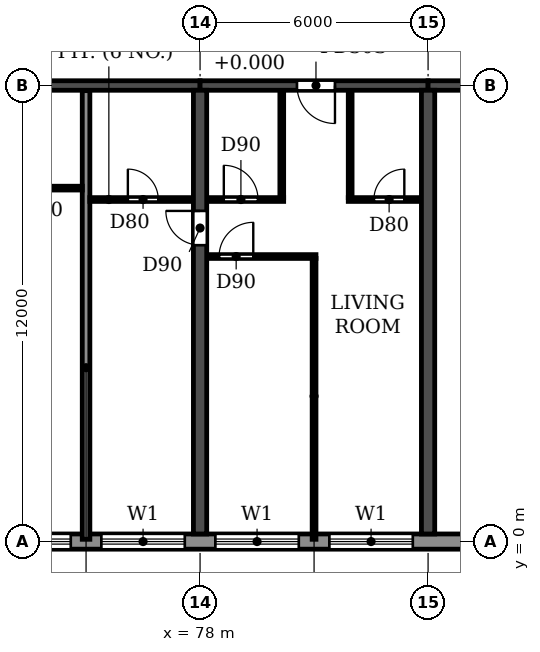
"""IFC4 building model, lengths in metres.
Left out: names, types, materials, properties, quantities, classifications, styles, units other than length and angle.
Written with IfcOpenShell. Run it as: python <this file> out.ifc"""

import sys

from ifc_helpers import new_model, si_unit, direction, frame, frame_2d, origin, place, context, subcontext, project, spatial, rectangle, extrude, element, fill, save


model = new_model("IFC4")
c1 = context("Model", 3, precision=1e-05, world=origin(), true_north=direction((0.0, 1.0)))
c2 = subcontext(c1, "Body", "Model", "MODEL_VIEW")
j1 = project(units=[si_unit("LENGTHUNIT", "METRE"), si_unit("PLANEANGLEUNIT", "RADIAN")], contexts=[c1])
p1 = place(None, origin())
s1 = spatial("IfcSite", under=j1, at=p1, CompositionType="ELEMENT")
p2 = place(p1, origin())
s2 = spatial("IfcBuilding", under=s1, at=p2, CompositionType="ELEMENT")
p3 = place(p2, frame((0.0, 0.0, 109.2)))
s3 = spatial("IfcBuildingStorey", under=s2, at=p3, CompositionType="ELEMENT", Elevation=109.2)
p4 = place(p3, frame((78.0, 0.2, 0.0), z_axis=(0.0, 0.0, 1.0), x_axis=(0.0, 1.0, 0.0)))
e1 = element("IfcWall", 1, at=p4, inside=s3, PredefinedType="SHEAR", context=c2, shape_type="SweptSolid", body=[
    extrude(rectangle(XDim=11.675, YDim=0.35, at=frame_2d((5.837, 0.0))), origin(), (0.0, 0.0, 1.0), 3.06),
])
p5 = place(p4, frame((7.6, 0.0, 0.0)))
e2 = element("IfcOpeningElement", 2, at=p5, cuts=e1, PredefinedType="OPENING", context=c2, shape_type="SweptSolid", body=[
    extrude(rectangle(XDim=0.9, YDim=2.1, at=frame_2d((0.45, 1.05))), frame((0.0, 0.185, 0.0), z_axis=(0.0, -1.0, 0.0), x_axis=(1.0, 0.0, 0.0)), (0.0, 0.0, 1.0), 0.37),
])
p6 = place(p3, frame((84.0, 0.2, 0.0), z_axis=(0.0, 0.0, 1.0), x_axis=(0.0, 1.0, 0.0)))
e3 = element("IfcWall", 3, at=p6, inside=s3, PredefinedType="SHEAR", context=c2, shape_type="SweptSolid", body=[
    extrude(rectangle(XDim=11.675, YDim=0.35, at=frame_2d((5.837, 0.0))), origin(), (0.0, 0.0, 1.0), 3.06),
])
p7 = place(p3, frame((72.0, 12.0, 0.0), z_axis=(0.0, 0.0, 1.0), x_axis=(1.0, 0.0, 0.0)))
e4 = element("IfcWall", 4, at=p7, inside=s3, PredefinedType="SHEAR", context=c2, shape_type="SweptSolid", body=[
    extrude(rectangle(XDim=6.0, YDim=0.25, at=frame_2d((3.0, 0.0))), origin(), (0.0, 0.0, 1.0), 2.46),
])
p8 = place(p3, frame((78.0, 12.0, 0.0), z_axis=(0.0, 0.0, 1.0), x_axis=(1.0, 0.0, 0.0)))
e5 = element("IfcWall", 5, at=p8, inside=s3, PredefinedType="SHEAR", context=c2, shape_type="SweptSolid", body=[
    extrude(rectangle(XDim=6.0, YDim=0.25, at=frame_2d((3.0, 0.0))), origin(), (0.0, 0.0, 1.0), 2.46),
])
p9 = place(p8, frame((2.55, 0.0, 0.0)))
e6 = element("IfcOpeningElement", 6, at=p9, cuts=e5, PredefinedType="OPENING", context=c2, shape_type="SweptSolid", body=[
    extrude(rectangle(XDim=1.0, YDim=2.1, at=frame_2d((0.5, 1.05))), frame((0.0, 0.135, 0.0), z_axis=(0.0, -1.0, 0.0), x_axis=(1.0, 0.0, 0.0)), (0.0, 0.0, 1.0), 0.27),
])
p10 = place(p3, frame((84.0, 12.0, 0.0), z_axis=(0.0, 0.0, 1.0), x_axis=(1.0, 0.0, 0.0)))
e7 = element("IfcWall", 7, at=p10, inside=s3, PredefinedType="SHEAR", context=c2, shape_type="SweptSolid", body=[
    extrude(rectangle(XDim=5.8, YDim=0.25, at=frame_2d((2.9, 0.0))), origin(), (0.0, 0.0, 1.0), 2.46),
])
p11 = place(p10, frame((2.5, 0.0, 0.0)))
e8 = element("IfcOpeningElement", 8, at=p11, cuts=e7, PredefinedType="OPENING", context=c2, shape_type="SweptSolid", body=[
    extrude(rectangle(XDim=1.0, YDim=2.1, at=frame_2d((0.5, 1.05))), frame((0.0, 0.135, 0.0), z_axis=(0.0, -1.0, 0.0), x_axis=(1.0, 0.0, 0.0)), (0.0, 0.0, 1.0), 0.27),
])
p12 = place(p3, frame((16.683, 0.0, 0.0), z_axis=(0.0, 0.0, 1.0), x_axis=(1.0, 0.0, 0.0)))
e9 = element("IfcWall", 9, at=p12, inside=s3, PredefinedType="STANDARD", context=c2, shape_type="SweptSolid", body=[
    extrude(rectangle(XDim=68.634, YDim=0.4, at=frame_2d((34.317, 0.0))), origin(), (0.0, 0.0, 1.0), 3.06),
])
p13 = place(p12, frame((1.717, 0.0, 0.9)))
e10 = element("IfcOpeningElement", 10, at=p13, cuts=e9, PredefinedType="OPENING", context=c2, shape_type="SweptSolid", body=[
    extrude(rectangle(XDim=2.2, YDim=1.5, at=frame_2d((1.1, 0.75))), frame((0.0, 0.21, 0.0), z_axis=(0.0, -1.0, 0.0), x_axis=(1.0, 0.0, 0.0)), (0.0, 0.0, 1.0), 0.42),
])
p14 = place(p12, frame((4.717, 0.0, 0.9)))
e11 = element("IfcOpeningElement", 11, at=p14, cuts=e9, PredefinedType="OPENING", context=c2, shape_type="SweptSolid", body=[
    extrude(rectangle(XDim=2.2, YDim=1.5, at=frame_2d((1.1, 0.75))), frame((0.0, 0.21, 0.0), z_axis=(0.0, -1.0, 0.0), x_axis=(1.0, 0.0, 0.0)), (0.0, 0.0, 1.0), 0.42),
])
p15 = place(p12, frame((7.717, 0.0, 0.9)))
e12 = element("IfcOpeningElement", 12, at=p15, cuts=e9, PredefinedType="OPENING", context=c2, shape_type="SweptSolid", body=[
    extrude(rectangle(XDim=2.2, YDim=1.5, at=frame_2d((1.1, 0.75))), frame((0.0, 0.21, 0.0), z_axis=(0.0, -1.0, 0.0), x_axis=(1.0, 0.0, 0.0)), (0.0, 0.0, 1.0), 0.42),
])
p16 = place(p12, frame((10.917, 0.0, 0.0)))
e13 = element("IfcOpeningElement", 13, at=p16, cuts=e9, PredefinedType="OPENING", context=c2, shape_type="SweptSolid", body=[
    extrude(rectangle(XDim=1.8, YDim=2.4, at=frame_2d((0.9, 1.2))), frame((0.0, 0.21, 0.0), z_axis=(0.0, -1.0, 0.0), x_axis=(1.0, 0.0, 0.0)), (0.0, 0.0, 1.0), 0.42),
])
p17 = place(p12, frame((13.717, 0.0, 0.9)))
e14 = element("IfcOpeningElement", 14, at=p17, cuts=e9, PredefinedType="OPENING", context=c2, shape_type="SweptSolid", body=[
    extrude(rectangle(XDim=2.2, YDim=1.5, at=frame_2d((1.1, 0.75))), frame((0.0, 0.21, 0.0), z_axis=(0.0, -1.0, 0.0), x_axis=(1.0, 0.0, 0.0)), (0.0, 0.0, 1.0), 0.42),
])
p18 = place(p12, frame((16.717, 0.0, 0.9)))
e15 = element("IfcOpeningElement", 15, at=p18, cuts=e9, PredefinedType="OPENING", context=c2, shape_type="SweptSolid", body=[
    extrude(rectangle(XDim=2.2, YDim=1.5, at=frame_2d((1.1, 0.75))), frame((0.0, 0.21, 0.0), z_axis=(0.0, -1.0, 0.0), x_axis=(1.0, 0.0, 0.0)), (0.0, 0.0, 1.0), 0.42),
])
p19 = place(p12, frame((19.717, 0.0, 0.9)))
e16 = element("IfcOpeningElement", 16, at=p19, cuts=e9, PredefinedType="OPENING", context=c2, shape_type="SweptSolid", body=[
    extrude(rectangle(XDim=2.2, YDim=1.5, at=frame_2d((1.1, 0.75))), frame((0.0, 0.21, 0.0), z_axis=(0.0, -1.0, 0.0), x_axis=(1.0, 0.0, 0.0)), (0.0, 0.0, 1.0), 0.42),
])
p20 = place(p12, frame((22.717, 0.0, 0.9)))
e17 = element("IfcOpeningElement", 17, at=p20, cuts=e9, PredefinedType="OPENING", context=c2, shape_type="SweptSolid", body=[
    extrude(rectangle(XDim=2.2, YDim=1.5, at=frame_2d((1.1, 0.75))), frame((0.0, 0.21, 0.0), z_axis=(0.0, -1.0, 0.0), x_axis=(1.0, 0.0, 0.0)), (0.0, 0.0, 1.0), 0.42),
])
p21 = place(p12, frame((25.717, 0.0, 0.9)))
e18 = element("IfcOpeningElement", 18, at=p21, cuts=e9, PredefinedType="OPENING", context=c2, shape_type="SweptSolid", body=[
    extrude(rectangle(XDim=2.2, YDim=1.5, at=frame_2d((1.1, 0.75))), frame((0.0, 0.21, 0.0), z_axis=(0.0, -1.0, 0.0), x_axis=(1.0, 0.0, 0.0)), (0.0, 0.0, 1.0), 0.42),
])
p22 = place(p12, frame((28.717, 0.0, 0.9)))
e19 = element("IfcOpeningElement", 19, at=p22, cuts=e9, PredefinedType="OPENING", context=c2, shape_type="SweptSolid", body=[
    extrude(rectangle(XDim=2.2, YDim=1.5, at=frame_2d((1.1, 0.75))), frame((0.0, 0.21, 0.0), z_axis=(0.0, -1.0, 0.0), x_axis=(1.0, 0.0, 0.0)), (0.0, 0.0, 1.0), 0.42),
])
p23 = place(p12, frame((31.917, 0.0, 0.0)))
e20 = element("IfcOpeningElement", 20, at=p23, cuts=e9, PredefinedType="OPENING", context=c2, shape_type="SweptSolid", body=[
    extrude(rectangle(XDim=1.8, YDim=2.4, at=frame_2d((0.9, 1.2))), frame((0.0, 0.21, 0.0), z_axis=(0.0, -1.0, 0.0), x_axis=(1.0, 0.0, 0.0)), (0.0, 0.0, 1.0), 0.42),
])
p24 = place(p12, frame((34.717, 0.0, 0.9)))
e21 = element("IfcOpeningElement", 21, at=p24, cuts=e9, PredefinedType="OPENING", context=c2, shape_type="SweptSolid", body=[
    extrude(rectangle(XDim=2.2, YDim=1.5, at=frame_2d((1.1, 0.75))), frame((0.0, 0.21, 0.0), z_axis=(0.0, -1.0, 0.0), x_axis=(1.0, 0.0, 0.0)), (0.0, 0.0, 1.0), 0.42),
])
p25 = place(p12, frame((37.717, 0.0, 0.9)))
e22 = element("IfcOpeningElement", 22, at=p25, cuts=e9, PredefinedType="OPENING", context=c2, shape_type="SweptSolid", body=[
    extrude(rectangle(XDim=2.2, YDim=1.5, at=frame_2d((1.1, 0.75))), frame((0.0, 0.21, 0.0), z_axis=(0.0, -1.0, 0.0), x_axis=(1.0, 0.0, 0.0)), (0.0, 0.0, 1.0), 0.42),
])
p26 = place(p12, frame((40.717, 0.0, 0.9)))
e23 = element("IfcOpeningElement", 23, at=p26, cuts=e9, PredefinedType="OPENING", context=c2, shape_type="SweptSolid", body=[
    extrude(rectangle(XDim=2.2, YDim=1.5, at=frame_2d((1.1, 0.75))), frame((0.0, 0.21, 0.0), z_axis=(0.0, -1.0, 0.0), x_axis=(1.0, 0.0, 0.0)), (0.0, 0.0, 1.0), 0.42),
])
p27 = place(p12, frame((43.717, 0.0, 0.9)))
e24 = element("IfcOpeningElement", 24, at=p27, cuts=e9, PredefinedType="OPENING", context=c2, shape_type="SweptSolid", body=[
    extrude(rectangle(XDim=2.2, YDim=1.5, at=frame_2d((1.1, 0.75))), frame((0.0, 0.21, 0.0), z_axis=(0.0, -1.0, 0.0), x_axis=(1.0, 0.0, 0.0)), (0.0, 0.0, 1.0), 0.42),
])
p28 = place(p12, frame((46.917, 0.0, 0.0)))
e25 = element("IfcOpeningElement", 25, at=p28, cuts=e9, PredefinedType="OPENING", context=c2, shape_type="SweptSolid", body=[
    extrude(rectangle(XDim=1.8, YDim=2.4, at=frame_2d((0.9, 1.2))), frame((0.0, 0.21, 0.0), z_axis=(0.0, -1.0, 0.0), x_axis=(1.0, 0.0, 0.0)), (0.0, 0.0, 1.0), 0.42),
])
p29 = place(p12, frame((49.717, 0.0, 0.9)))
e26 = element("IfcOpeningElement", 26, at=p29, cuts=e9, PredefinedType="OPENING", context=c2, shape_type="SweptSolid", body=[
    extrude(rectangle(XDim=2.2, YDim=1.5, at=frame_2d((1.1, 0.75))), frame((0.0, 0.21, 0.0), z_axis=(0.0, -1.0, 0.0), x_axis=(1.0, 0.0, 0.0)), (0.0, 0.0, 1.0), 0.42),
])
p30 = place(p12, frame((52.717, 0.0, 0.9)))
e27 = element("IfcOpeningElement", 27, at=p30, cuts=e9, PredefinedType="OPENING", context=c2, shape_type="SweptSolid", body=[
    extrude(rectangle(XDim=2.2, YDim=1.5, at=frame_2d((1.1, 0.75))), frame((0.0, 0.21, 0.0), z_axis=(0.0, -1.0, 0.0), x_axis=(1.0, 0.0, 0.0)), (0.0, 0.0, 1.0), 0.42),
])
p31 = place(p12, frame((55.717, 0.0, 0.9)))
e28 = element("IfcOpeningElement", 28, at=p31, cuts=e9, PredefinedType="OPENING", context=c2, shape_type="SweptSolid", body=[
    extrude(rectangle(XDim=2.2, YDim=1.5, at=frame_2d((1.1, 0.75))), frame((0.0, 0.21, 0.0), z_axis=(0.0, -1.0, 0.0), x_axis=(1.0, 0.0, 0.0)), (0.0, 0.0, 1.0), 0.42),
])
p32 = place(p12, frame((58.717, 0.0, 0.9)))
e29 = element("IfcOpeningElement", 29, at=p32, cuts=e9, PredefinedType="OPENING", context=c2, shape_type="SweptSolid", body=[
    extrude(rectangle(XDim=2.2, YDim=1.5, at=frame_2d((1.1, 0.75))), frame((0.0, 0.21, 0.0), z_axis=(0.0, -1.0, 0.0), x_axis=(1.0, 0.0, 0.0)), (0.0, 0.0, 1.0), 0.42),
])
p33 = place(p12, frame((61.717, 0.0, 0.9)))
e30 = element("IfcOpeningElement", 30, at=p33, cuts=e9, PredefinedType="OPENING", context=c2, shape_type="SweptSolid", body=[
    extrude(rectangle(XDim=2.2, YDim=1.5, at=frame_2d((1.1, 0.75))), frame((0.0, 0.21, 0.0), z_axis=(0.0, -1.0, 0.0), x_axis=(1.0, 0.0, 0.0)), (0.0, 0.0, 1.0), 0.42),
])
p34 = place(p12, frame((64.717, 0.0, 0.9)))
e31 = element("IfcOpeningElement", 31, at=p34, cuts=e9, PredefinedType="OPENING", context=c2, shape_type="SweptSolid", body=[
    extrude(rectangle(XDim=2.2, YDim=1.5, at=frame_2d((1.1, 0.75))), frame((0.0, 0.21, 0.0), z_axis=(0.0, -1.0, 0.0), x_axis=(1.0, 0.0, 0.0)), (0.0, 0.0, 1.0), 0.42),
])
p35 = place(p3, frame((75.0, 0.06, 0.0), z_axis=(0.0, 0.0, 1.0), x_axis=(0.0, 1.0, 0.0)))
e32 = element("IfcWall", 32, at=p35, inside=s3, PredefinedType="PARTITIONING", context=c2, shape_type="SweptSolid", body=[
    extrude(rectangle(XDim=11.805, YDim=0.2, at=frame_2d((5.902, 0.0))), origin(), (0.0, 0.0, 1.0), 3.06),
])
p36 = place(p3, frame((78.185, 7.5, 0.0), z_axis=(0.0, 0.0, 1.0), x_axis=(1.0, 0.0, 0.0)))
e33 = element("IfcWall", 33, at=p36, inside=s3, PredefinedType="PARTITIONING", context=c2, shape_type="SweptSolid", body=[
    extrude(rectangle(XDim=2.865, YDim=0.1, at=frame_2d((1.433, 0.0))), origin(), (0.0, 0.0, 1.0), 3.06),
])
p37 = place(p36, frame((0.315, 0.0, 0.0)))
e34 = element("IfcOpeningElement", 34, at=p37, cuts=e33, PredefinedType="OPENING", context=c2, shape_type="SweptSolid", body=[
    extrude(rectangle(XDim=0.9, YDim=2.1, at=frame_2d((0.45, 1.05))), frame((0.0, 0.06, 0.0), z_axis=(0.0, -1.0, 0.0), x_axis=(1.0, 0.0, 0.0)), (0.0, 0.0, 1.0), 0.12),
])
p38 = place(p3, frame((75.1, 9.0, 0.0), z_axis=(0.0, 0.0, 1.0), x_axis=(1.0, 0.0, 0.0)))
e35 = element("IfcWall", 35, at=p38, inside=s3, PredefinedType="PARTITIONING", context=c2, shape_type="SweptSolid", body=[
    extrude(rectangle(XDim=2.715, YDim=0.1, at=frame_2d((1.357, 0.0))), origin(), (0.0, 0.0, 1.0), 3.06),
])
p39 = place(p38, frame((1.0, 0.0, 0.0)))
e36 = element("IfcOpeningElement", 36, at=p39, cuts=e35, PredefinedType="OPENING", context=c2, shape_type="SweptSolid", body=[
    extrude(rectangle(XDim=0.8, YDim=2.1, at=frame_2d((0.4, 1.05))), frame((0.0, 0.06, 0.0), z_axis=(0.0, -1.0, 0.0), x_axis=(1.0, 0.0, 0.0)), (0.0, 0.0, 1.0), 0.12),
])
p40 = place(p3, frame((78.185, 9.0, 0.0), z_axis=(0.0, 0.0, 1.0), x_axis=(1.0, 0.0, 0.0)))
e37 = element("IfcWall", 37, at=p40, inside=s3, PredefinedType="PARTITIONING", context=c2, shape_type="SweptSolid", body=[
    extrude(rectangle(XDim=2.015, YDim=0.1, at=frame_2d((1.007, 0.0))), origin(), (0.0, 0.0, 1.0), 3.06),
])
p41 = place(p40, frame((0.44, 0.0, 0.0)))
e38 = element("IfcOpeningElement", 38, at=p41, cuts=e37, PredefinedType="OPENING", context=c2, shape_type="SweptSolid", body=[
    extrude(rectangle(XDim=0.9, YDim=2.1, at=frame_2d((0.45, 1.05))), frame((0.0, 0.06, 0.0), z_axis=(0.0, -1.0, 0.0), x_axis=(1.0, 0.0, 0.0)), (0.0, 0.0, 1.0), 0.12),
])
p42 = place(p3, frame((81.9, 9.0, 0.0), z_axis=(0.0, 0.0, 1.0), x_axis=(1.0, 0.0, 0.0)))
e39 = element("IfcWall", 39, at=p42, inside=s3, PredefinedType="PARTITIONING", context=c2, shape_type="SweptSolid", body=[
    extrude(rectangle(XDim=1.915, YDim=0.1, at=frame_2d((0.958, 0.0))), origin(), (0.0, 0.0, 1.0), 3.06),
])
p43 = place(p42, frame((0.675, 0.0, 0.0)))
e40 = element("IfcOpeningElement", 40, at=p43, cuts=e39, PredefinedType="OPENING", context=c2, shape_type="SweptSolid", body=[
    extrude(rectangle(XDim=0.8, YDim=2.1, at=frame_2d((0.4, 1.05))), frame((0.0, 0.06, 0.0), z_axis=(0.0, -1.0, 0.0), x_axis=(1.0, 0.0, 0.0)), (0.0, 0.0, 1.0), 0.12),
])
p44 = place(p3, frame((72.185, 9.3, 0.0), z_axis=(0.0, 0.0, 1.0), x_axis=(1.0, 0.0, 0.0)))
e41 = element("IfcWall", 41, at=p44, inside=s3, PredefinedType="PARTITIONING", context=c2, shape_type="SweptSolid", body=[
    extrude(rectangle(XDim=2.715, YDim=0.1, at=frame_2d((1.357, 0.0))), origin(), (0.0, 0.0, 1.0), 3.06),
])
p45 = place(p44, frame((0.915, 0.0, 0.0)))
e42 = element("IfcOpeningElement", 42, at=p45, cuts=e41, PredefinedType="OPENING", context=c2, shape_type="SweptSolid", body=[
    extrude(rectangle(XDim=0.8, YDim=2.1, at=frame_2d((0.4, 1.05))), frame((0.0, 0.06, 0.0), z_axis=(0.0, -1.0, 0.0), x_axis=(1.0, 0.0, 0.0)), (0.0, 0.0, 1.0), 0.12),
])
p46 = place(p3, frame((80.15, 9.05, 0.0), z_axis=(0.0, 0.0, 1.0), x_axis=(0.0, 1.0, 0.0)))
e43 = element("IfcWall", 43, at=p46, inside=s3, PredefinedType="PARTITIONING", context=c2, shape_type="SweptSolid", body=[
    extrude(rectangle(XDim=2.815, YDim=0.1, at=frame_2d((1.407, 0.0))), origin(), (0.0, 0.0, 1.0), 3.06),
])
p47 = place(p3, frame((81.0, 0.06, 0.0), z_axis=(0.0, 0.0, 1.0), x_axis=(0.0, 1.0, 0.0)))
e44 = element("IfcWall", 44, at=p47, inside=s3, PredefinedType="PARTITIONING", context=c2, shape_type="SweptSolid", body=[
    extrude(rectangle(XDim=7.39, YDim=0.1, at=frame_2d((3.695, 0.0))), origin(), (0.0, 0.0, 1.0), 3.06),
])
p48 = place(p3, frame((81.95, 9.05, 0.0), z_axis=(0.0, 0.0, 1.0), x_axis=(0.0, 1.0, 0.0)))
e45 = element("IfcWall", 45, at=p48, inside=s3, PredefinedType="PARTITIONING", context=c2, shape_type="SweptSolid", body=[
    extrude(rectangle(XDim=2.815, YDim=0.1, at=frame_2d((1.407, 0.0))), origin(), (0.0, 0.0, 1.0), 3.06),
])
p49 = place(p31, origin())
e46 = element("IfcWindow", 46, at=p49, inside=s3, PartitioningType="DOUBLE_PANEL_HORIZONTAL", PredefinedType="WINDOW", context=c2, shape_type="SweptSolid", body=[
    extrude(rectangle(XDim=2.2, YDim=1.5, at=frame_2d((1.1, 0.75))), frame((0.0, 0.03, 0.0), z_axis=(0.0, -1.0, 0.0), x_axis=(1.0, 0.0, 0.0)), (0.0, 0.0, 1.0), 0.06),
])
fill(e28, e46)
p50 = place(p32, origin())
e47 = element("IfcWindow", 47, at=p50, inside=s3, PartitioningType="DOUBLE_PANEL_HORIZONTAL", PredefinedType="WINDOW", context=c2, shape_type="SweptSolid", body=[
    extrude(rectangle(XDim=2.2, YDim=1.5, at=frame_2d((1.1, 0.75))), frame((0.0, 0.03, 0.0), z_axis=(0.0, -1.0, 0.0), x_axis=(1.0, 0.0, 0.0)), (0.0, 0.0, 1.0), 0.06),
])
fill(e29, e47)
p51 = place(p33, origin())
e48 = element("IfcWindow", 48, at=p51, inside=s3, PartitioningType="DOUBLE_PANEL_HORIZONTAL", PredefinedType="WINDOW", context=c2, shape_type="SweptSolid", body=[
    extrude(rectangle(XDim=2.2, YDim=1.5, at=frame_2d((1.1, 0.75))), frame((0.0, 0.03, 0.0), z_axis=(0.0, -1.0, 0.0), x_axis=(1.0, 0.0, 0.0)), (0.0, 0.0, 1.0), 0.06),
])
fill(e30, e48)
p52 = place(p34, origin())
e49 = element("IfcWindow", 49, at=p52, inside=s3, PartitioningType="DOUBLE_PANEL_HORIZONTAL", PredefinedType="WINDOW", context=c2, shape_type="SweptSolid", body=[
    extrude(rectangle(XDim=2.2, YDim=1.5, at=frame_2d((1.1, 0.75))), frame((0.0, 0.03, 0.0), z_axis=(0.0, -1.0, 0.0), x_axis=(1.0, 0.0, 0.0)), (0.0, 0.0, 1.0), 0.06),
])
fill(e31, e49)
p53 = place(p39, origin())
e50 = element("IfcDoor", 50, at=p53, inside=s3, OperationType="SINGLE_SWING_LEFT", PredefinedType="DOOR", context=c2, shape_type="SweptSolid", body=[
    extrude(rectangle(XDim=0.8, YDim=2.1, at=frame_2d((0.4, 1.05))), frame((0.0, 0.025, 0.0), z_axis=(0.0, -1.0, 0.0), x_axis=(1.0, 0.0, 0.0)), (0.0, 0.0, 1.0), 0.05),
])
fill(e36, e50)
p54 = place(p5, origin())
e51 = element("IfcDoor", 51, at=p54, inside=s3, OperationType="SINGLE_SWING_RIGHT", PredefinedType="DOOR", context=c2, shape_type="SweptSolid", body=[
    extrude(rectangle(XDim=0.9, YDim=2.1, at=frame_2d((0.45, 1.05))), frame((0.0, 0.025, 0.0), z_axis=(0.0, -1.0, 0.0), x_axis=(1.0, 0.0, 0.0)), (0.0, 0.0, 1.0), 0.05),
])
fill(e2, e51)
p55 = place(p37, origin())
e52 = element("IfcDoor", 52, at=p55, inside=s3, OperationType="SINGLE_SWING_RIGHT", PredefinedType="DOOR", context=c2, shape_type="SweptSolid", body=[
    extrude(rectangle(XDim=0.9, YDim=2.1, at=frame_2d((0.45, 1.05))), frame((0.0, 0.025, 0.0), z_axis=(0.0, -1.0, 0.0), x_axis=(1.0, 0.0, 0.0)), (0.0, 0.0, 1.0), 0.05),
])
fill(e34, e52)
p56 = place(p41, origin())
e53 = element("IfcDoor", 53, at=p56, inside=s3, OperationType="SINGLE_SWING_LEFT", PredefinedType="DOOR", context=c2, shape_type="SweptSolid", body=[
    extrude(rectangle(XDim=0.9, YDim=2.1, at=frame_2d((0.45, 1.05))), frame((0.0, 0.025, 0.0), z_axis=(0.0, -1.0, 0.0), x_axis=(1.0, 0.0, 0.0)), (0.0, 0.0, 1.0), 0.05),
])
fill(e38, e53)
p57 = place(p9, frame((1.0, 0.0, 0.0), z_axis=(0.0, 0.0, 1.0), x_axis=(-1.0, 0.0, 0.0)))
e54 = element("IfcDoor", 54, at=p57, inside=s3, OperationType="SINGLE_SWING_LEFT", PredefinedType="DOOR", context=c2, shape_type="SweptSolid", body=[
    extrude(rectangle(XDim=1.0, YDim=2.1, at=frame_2d((0.5, 1.05))), frame((0.0, 0.025, 0.0), z_axis=(0.0, -1.0, 0.0), x_axis=(1.0, 0.0, 0.0)), (0.0, 0.0, 1.0), 0.05),
])
fill(e6, e54)
p58 = place(p43, origin())
e55 = element("IfcDoor", 55, at=p58, inside=s3, OperationType="SINGLE_SWING_RIGHT", PredefinedType="DOOR", context=c2, shape_type="SweptSolid", body=[
    extrude(rectangle(XDim=0.8, YDim=2.1, at=frame_2d((0.4, 1.05))), frame((0.0, 0.025, 0.0), z_axis=(0.0, -1.0, 0.0), x_axis=(1.0, 0.0, 0.0)), (0.0, 0.0, 1.0), 0.05),
])
fill(e40, e55)
save(model, sys.argv[1])
